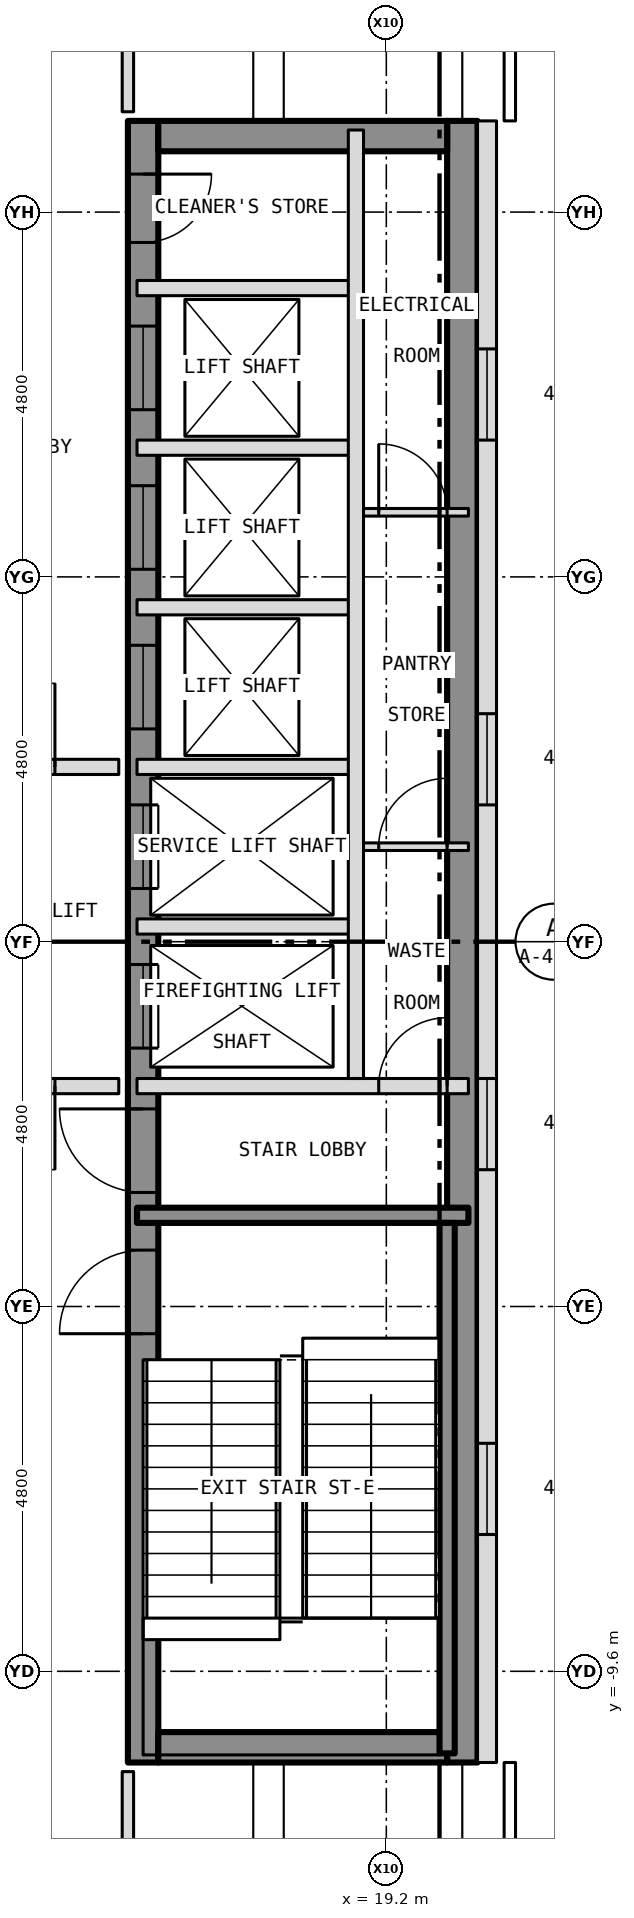
"""IFC4 building model, lengths in metres.
Left out: names, types, materials, properties, quantities, classifications, styles, units other than length and angle.
Written with IfcOpenShell. Run it as: python <this file> out.ifc"""

import sys

from ifc_helpers import new_model, si_unit, direction, frame, frame_2d, origin, place, context, subcontext, project, spatial, rectangle, extrude, element, fill, save


model = new_model("IFC4")
c1 = context("Model", 3, precision=1e-05, world=origin(), true_north=direction((0.0, 1.0)))
c2 = subcontext(c1, "Body", "Model", "MODEL_VIEW")
j1 = project(units=[si_unit("LENGTHUNIT", "METRE"), si_unit("PLANEANGLEUNIT", "RADIAN")], contexts=[c1])
p1 = place(None, origin())
s1 = spatial("IfcSite", under=j1, at=p1, CompositionType="ELEMENT")
p2 = place(p1, origin())
s2 = spatial("IfcBuilding", under=s1, at=p2, CompositionType="ELEMENT")
p3 = place(p2, frame((0.0, 0.0, 236.5)))
s3 = spatial("IfcBuildingStorey", under=s2, at=p3, CompositionType="ELEMENT", Elevation=236.5)
p4 = place(p3, frame((16.0, -10.8, 0.0), z_axis=(0.0, 0.0, 1.0), x_axis=(0.0, 1.0, 0.0)))
e1 = element("IfcWall", 1, at=p4, inside=s3, PredefinedType="SHEAR", context=c2, shape_type="SweptSolid", body=[
    extrude(rectangle(XDim=21.6, YDim=0.4, at=frame_2d((10.8, 0.0))), origin(), (0.0, 0.0, 1.0), 3.9),
])
p5 = place(p4, frame((9.4, 0.0, 0.0)))
e2 = element("IfcOpeningElement", 2, at=p5, cuts=e1, PredefinedType="OPENING", context=c2, shape_type="SweptSolid", body=[
    extrude(rectangle(XDim=1.1, YDim=2.1, at=frame_2d((0.55, 1.05))), frame((0.0, 0.212, 0.0), z_axis=(0.0, -1.0, 0.0), x_axis=(1.0, 0.0, 0.0)), (0.0, 0.0, 1.0), 0.424),
])
p6 = place(p4, frame((11.5, 0.0, 0.0)))
e3 = element("IfcOpeningElement", 3, at=p6, cuts=e1, PredefinedType="OPENING", context=c2, shape_type="SweptSolid", body=[
    extrude(rectangle(XDim=1.1, YDim=2.1, at=frame_2d((0.55, 1.05))), frame((0.0, 0.212, 0.0), z_axis=(0.0, -1.0, 0.0), x_axis=(1.0, 0.0, 0.0)), (0.0, 0.0, 1.0), 0.424),
])
p7 = place(p4, frame((13.6, 0.0, 0.0)))
e4 = element("IfcOpeningElement", 4, at=p7, cuts=e1, PredefinedType="OPENING", context=c2, shape_type="SweptSolid", body=[
    extrude(rectangle(XDim=1.1, YDim=2.1, at=frame_2d((0.55, 1.05))), frame((0.0, 0.212, 0.0), z_axis=(0.0, -1.0, 0.0), x_axis=(1.0, 0.0, 0.0)), (0.0, 0.0, 1.0), 0.424),
])
p8 = place(p4, frame((15.7, 0.0, 0.0)))
e5 = element("IfcOpeningElement", 5, at=p8, cuts=e1, PredefinedType="OPENING", context=c2, shape_type="SweptSolid", body=[
    extrude(rectangle(XDim=1.1, YDim=2.1, at=frame_2d((0.55, 1.05))), frame((0.0, 0.212, 0.0), z_axis=(0.0, -1.0, 0.0), x_axis=(1.0, 0.0, 0.0)), (0.0, 0.0, 1.0), 0.424),
])
p9 = place(p4, frame((17.8, 0.0, 0.0)))
e6 = element("IfcOpeningElement", 6, at=p9, cuts=e1, PredefinedType="OPENING", context=c2, shape_type="SweptSolid", body=[
    extrude(rectangle(XDim=1.1, YDim=2.1, at=frame_2d((0.55, 1.05))), frame((0.0, 0.212, 0.0), z_axis=(0.0, -1.0, 0.0), x_axis=(1.0, 0.0, 0.0)), (0.0, 0.0, 1.0), 0.424),
])
p10 = place(p4, frame((5.642, 0.0, 0.0)))
e7 = element("IfcOpeningElement", 7, at=p10, cuts=e1, PredefinedType="OPENING", context=c2, shape_type="SweptSolid", body=[
    extrude(rectangle(XDim=1.1, YDim=2.1, at=frame_2d((0.55, 1.05))), frame((0.0, 0.212, 0.0), z_axis=(0.0, -1.0, 0.0), x_axis=(1.0, 0.0, 0.0)), (0.0, 0.0, 1.0), 0.424),
])
p11 = place(p4, frame((7.5, 0.0, 0.0)))
e8 = element("IfcOpeningElement", 8, at=p11, cuts=e1, PredefinedType="OPENING", context=c2, shape_type="SweptSolid", body=[
    extrude(rectangle(XDim=1.1, YDim=2.1, at=frame_2d((0.55, 1.05))), frame((0.0, 0.212, 0.0), z_axis=(0.0, -1.0, 0.0), x_axis=(1.0, 0.0, 0.0)), (0.0, 0.0, 1.0), 0.424),
])
p12 = place(p4, frame((20.0, 0.0, 0.0)))
e9 = element("IfcOpeningElement", 9, at=p12, cuts=e1, PredefinedType="OPENING", context=c2, shape_type="SweptSolid", body=[
    extrude(rectangle(XDim=0.9, YDim=2.1, at=frame_2d((0.45, 1.05))), frame((0.0, 0.212, 0.0), z_axis=(0.0, -1.0, 0.0), x_axis=(1.0, 0.0, 0.0)), (0.0, 0.0, 1.0), 0.424),
])
p13 = place(p3, frame((20.2, -10.8, 0.0), z_axis=(0.0, 0.0, 1.0), x_axis=(0.0, 1.0, 0.0)))
e10 = element("IfcWall", 10, at=p13, inside=s3, PredefinedType="SHEAR", context=c2, shape_type="SweptSolid", body=[
    extrude(rectangle(XDim=21.6, YDim=0.4, at=frame_2d((10.8, 0.0))), origin(), (0.0, 0.0, 1.0), 3.9),
])
for number, where, z_axis, x_axis in (
    (11, (16.2, 10.6, 0.0), (0.0, 0.0, 1.0), (1.0, 0.0, 0.0)),
    (12, (16.2, -10.6, 0.0), (0.0, 0.0, 1.0), (1.0, 0.0, 0.0)),
):
    element("IfcWall", number, at=place(p3, frame(where, z_axis=z_axis, x_axis=x_axis)), inside=s3, PredefinedType="SHEAR", context=c2, shape_type="SweptSolid", body=[
        extrude(rectangle(XDim=3.8, YDim=0.4, at=frame_2d((1.9, 0.0))), origin(), (0.0, 0.0, 1.0), 3.9),
    ])
p14 = place(p3, frame((20.525, -10.8, 0.0), z_axis=(0.0, 0.0, 1.0), x_axis=(0.0, 1.0, 0.0)))
e13 = element("IfcWall", 13, at=p14, inside=s3, PredefinedType="SOLIDWALL", context=c2, shape_type="SweptSolid", body=[
    extrude(rectangle(XDim=21.6, YDim=0.25, at=frame_2d((10.8, 0.0))), origin(), (0.0, 0.0, 1.0), 4.5),
])
p15 = place(p14, frame((3.0, 0.0, 2.2)))
e14 = element("IfcOpeningElement", 14, at=p15, cuts=e13, PredefinedType="OPENING", context=c2, shape_type="SweptSolid", body=[
    extrude(rectangle(XDim=1.2, YDim=0.6, at=frame_2d((0.6, 0.3))), frame((0.0, 0.137, 0.0), z_axis=(0.0, -1.0, 0.0), x_axis=(1.0, 0.0, 0.0)), (0.0, 0.0, 1.0), 0.274),
])
p16 = place(p14, frame((7.8, 0.0, 2.2)))
e15 = element("IfcOpeningElement", 15, at=p16, cuts=e13, PredefinedType="OPENING", context=c2, shape_type="SweptSolid", body=[
    extrude(rectangle(XDim=1.2, YDim=0.6, at=frame_2d((0.6, 0.3))), frame((0.0, 0.137, 0.0), z_axis=(0.0, -1.0, 0.0), x_axis=(1.0, 0.0, 0.0)), (0.0, 0.0, 1.0), 0.274),
])
p17 = place(p14, frame((12.6, 0.0, 2.2)))
e16 = element("IfcOpeningElement", 16, at=p17, cuts=e13, PredefinedType="OPENING", context=c2, shape_type="SweptSolid", body=[
    extrude(rectangle(XDim=1.2, YDim=0.6, at=frame_2d((0.6, 0.3))), frame((0.0, 0.137, 0.0), z_axis=(0.0, -1.0, 0.0), x_axis=(1.0, 0.0, 0.0)), (0.0, 0.0, 1.0), 0.274),
])
p18 = place(p14, frame((17.4, 0.0, 2.2)))
e17 = element("IfcOpeningElement", 17, at=p18, cuts=e13, PredefinedType="OPENING", context=c2, shape_type="SweptSolid", body=[
    extrude(rectangle(XDim=1.2, YDim=0.6, at=frame_2d((0.6, 0.3))), frame((0.0, 0.137, 0.0), z_axis=(0.0, -1.0, 0.0), x_axis=(1.0, 0.0, 0.0)), (0.0, 0.0, 1.0), 0.274),
])
p19 = place(p3, frame((15.92, -3.6, 0.0), z_axis=(0.0, 0.0, 1.0), x_axis=(1.0, 0.0, 0.0)))
e18 = element("IfcWall", 18, at=p19, inside=s3, PredefinedType="SHEAR", context=c2, shape_type="SweptSolid", body=[
    extrude(rectangle(XDim=4.36, YDim=0.2, at=frame_2d((2.18, 0.0))), origin(), (0.0, 0.0, 1.0), 3.9),
])
p20 = place(p3, frame((12.4, -1.9, 0.0), z_axis=(0.0, 0.0, 1.0), x_axis=(1.0, 0.0, 0.0)))
e19 = element("IfcWall", 19, at=p20, inside=s3, PredefinedType="PARTITIONING", context=c2, shape_type="SweptSolid", body=[
    extrude(rectangle(XDim=3.28, YDim=0.2, at=frame_2d((1.64, 0.0))), origin(), (0.0, 0.0, 1.0), 4.35),
])
p21 = place(p20, frame((1.34, 0.0, 0.0)))
e20 = element("IfcOpeningElement", 20, at=p21, cuts=e19, PredefinedType="OPENING", context=c2, shape_type="SweptSolid", body=[
    extrude(rectangle(XDim=1.1, YDim=2.1, at=frame_2d((0.55, 1.05))), frame((0.0, 0.112, 0.0), z_axis=(0.0, -1.0, 0.0), x_axis=(1.0, 0.0, 0.0)), (0.0, 0.0, 1.0), 0.224),
])
p22 = place(p3, frame((15.92, -1.9, 0.0), z_axis=(0.0, 0.0, 1.0), x_axis=(1.0, 0.0, 0.0)))
e21 = element("IfcWall", 21, at=p22, inside=s3, PredefinedType="PARTITIONING", context=c2, shape_type="SweptSolid", body=[
    extrude(rectangle(XDim=4.36, YDim=0.2, at=frame_2d((2.18, 0.0))), origin(), (0.0, 0.0, 1.0), 3.9),
])
p23 = place(p22, frame((3.18, 0.0, 0.0)))
e22 = element("IfcOpeningElement", 22, at=p23, cuts=e21, PredefinedType="OPENING", context=c2, shape_type="SweptSolid", body=[
    extrude(rectangle(XDim=0.9, YDim=2.1, at=frame_2d((0.45, 1.05))), frame((0.0, 0.112, 0.0), z_axis=(0.0, -1.0, 0.0), x_axis=(1.0, 0.0, 0.0)), (0.0, 0.0, 1.0), 0.224),
])
p24 = place(p3, frame((15.92, 0.2, 0.0), z_axis=(0.0, 0.0, 1.0), x_axis=(1.0, 0.0, 0.0)))
e23 = element("IfcWall", 23, at=p24, inside=s3, PredefinedType="PARTITIONING", context=c2, shape_type="SweptSolid", body=[
    extrude(rectangle(XDim=2.88, YDim=0.2, at=frame_2d((1.44, 0.0))), origin(), (0.0, 0.0, 1.0), 3.9),
])
p25 = place(p3, frame((18.8, 1.25, 0.0), z_axis=(0.0, 0.0, 1.0), x_axis=(1.0, 0.0, 0.0)))
e24 = element("IfcWall", 24, at=p25, inside=s3, PredefinedType="PARTITIONING", context=c2, shape_type="SweptSolid", body=[
    extrude(rectangle(XDim=1.48, YDim=0.1, at=frame_2d((0.74, 0.0))), origin(), (0.0, 0.0, 1.0), 3.9),
])
p26 = place(p25, frame((0.3, 0.0, 0.0)))
e25 = element("IfcOpeningElement", 25, at=p26, cuts=e24, PredefinedType="OPENING", context=c2, shape_type="SweptSolid", body=[
    extrude(rectangle(XDim=0.9, YDim=2.1, at=frame_2d((0.45, 1.05))), frame((0.0, 0.062, 0.0), z_axis=(0.0, -1.0, 0.0), x_axis=(1.0, 0.0, 0.0)), (0.0, 0.0, 1.0), 0.124),
])
p27 = place(p3, frame((12.4, 2.3, 0.0), z_axis=(0.0, 0.0, 1.0), x_axis=(1.0, 0.0, 0.0)))
e26 = element("IfcWall", 26, at=p27, inside=s3, PredefinedType="PARTITIONING", context=c2, shape_type="SweptSolid", body=[
    extrude(rectangle(XDim=3.28, YDim=0.2, at=frame_2d((1.64, 0.0))), origin(), (0.0, 0.0, 1.0), 4.35),
])
p28 = place(p27, frame((1.34, 0.0, 0.0)))
e27 = element("IfcOpeningElement", 27, at=p28, cuts=e26, PredefinedType="OPENING", context=c2, shape_type="SweptSolid", body=[
    extrude(rectangle(XDim=1.1, YDim=2.1, at=frame_2d((0.55, 1.05))), frame((0.0, 0.112, 0.0), z_axis=(0.0, -1.0, 0.0), x_axis=(1.0, 0.0, 0.0)), (0.0, 0.0, 1.0), 0.224),
])
for number, where, z_axis, x_axis in (
    (28, (15.92, 2.3, 0.0), (0.0, 0.0, 1.0), (1.0, 0.0, 0.0)),
    (29, (15.92, 4.4, 0.0), (0.0, 0.0, 1.0), (1.0, 0.0, 0.0)),
):
    element("IfcWall", number, at=place(p3, frame(where, z_axis=z_axis, x_axis=x_axis)), inside=s3, PredefinedType="PARTITIONING", context=c2, shape_type="SweptSolid", body=[
        extrude(rectangle(XDim=2.88, YDim=0.2, at=frame_2d((1.44, 0.0))), origin(), (0.0, 0.0, 1.0), 3.9),
    ])
p29 = place(p3, frame((18.8, 5.65, 0.0), z_axis=(0.0, 0.0, 1.0), x_axis=(1.0, 0.0, 0.0)))
e30 = element("IfcWall", 30, at=p29, inside=s3, PredefinedType="PARTITIONING", context=c2, shape_type="SweptSolid", body=[
    extrude(rectangle(XDim=1.48, YDim=0.1, at=frame_2d((0.74, 0.0))), origin(), (0.0, 0.0, 1.0), 3.9),
])
p30 = place(p29, frame((0.3, 0.0, 0.0)))
e31 = element("IfcOpeningElement", 31, at=p30, cuts=e30, PredefinedType="OPENING", context=c2, shape_type="SweptSolid", body=[
    extrude(rectangle(XDim=0.9, YDim=2.1, at=frame_2d((0.45, 1.05))), frame((0.0, 0.062, 0.0), z_axis=(0.0, -1.0, 0.0), x_axis=(1.0, 0.0, 0.0)), (0.0, 0.0, 1.0), 0.124),
])
for number, where, z_axis, x_axis in (
    (32, (15.92, 6.5, 0.0), (0.0, 0.0, 1.0), (1.0, 0.0, 0.0)),
    (33, (15.92, 8.6, 0.0), (0.0, 0.0, 1.0), (1.0, 0.0, 0.0)),
):
    element("IfcWall", number, at=place(p3, frame(where, z_axis=z_axis, x_axis=x_axis)), inside=s3, PredefinedType="PARTITIONING", context=c2, shape_type="SweptSolid", body=[
        extrude(rectangle(XDim=2.88, YDim=0.2, at=frame_2d((1.44, 0.0))), origin(), (0.0, 0.0, 1.0), 3.9),
    ])
for number, where, z_axis, x_axis in (
    (34, (15.8, -12.725, 0.0), (0.0, 0.0, 1.0), (0.0, 1.0, 0.0)),
    (35, (15.8, 10.92, 0.0), (0.0, 0.0, 1.0), (0.0, 1.0, 0.0)),
):
    element("IfcWall", number, at=place(p3, frame(where, z_axis=z_axis, x_axis=x_axis)), inside=s3, PredefinedType="PARTITIONING", context=c2, shape_type="SweptSolid", body=[
        extrude(rectangle(XDim=1.805, YDim=0.15, at=frame_2d((0.903, 0.0))), origin(), (0.0, 0.0, 1.0), 4.35),
    ])
p31 = place(p3, frame((18.8, -1.8, 0.0), z_axis=(0.0, 0.0, 1.0), x_axis=(0.0, 1.0, 0.0)))
e36 = element("IfcWall", 36, at=p31, inside=s3, PredefinedType="PARTITIONING", context=c2, shape_type="SweptSolid", body=[
    extrude(rectangle(XDim=12.48, YDim=0.2, at=frame_2d((6.24, 0.0))), origin(), (0.0, 0.0, 1.0), 3.9),
])
p32 = place(p3, frame((20.0, -10.68, 0.0), z_axis=(0.0, 0.0, 1.0), x_axis=(0.0, 1.0, 0.0)))
e37 = element("IfcWall", 37, at=p32, inside=s3, PredefinedType="SHEAR", context=c2, shape_type="SweptSolid", body=[
    extrude(rectangle(XDim=6.98, YDim=0.2, at=frame_2d((3.49, 0.0))), origin(), (0.0, 0.0, 1.0), 3.9),
])
p33 = place(p15, origin())
e38 = element("IfcWindow", 38, at=p33, inside=s3, PartitioningType="SINGLE_PANEL", PredefinedType="WINDOW", context=c2, shape_type="SweptSolid", body=[
    extrude(rectangle(XDim=1.2, YDim=0.6, at=frame_2d((0.6, 0.3))), frame((0.0, -0.035, 0.0), z_axis=(0.0, -1.0, 0.0), x_axis=(1.0, 0.0, 0.0)), (0.0, 0.0, 1.0), 0.06),
])
fill(e14, e38)
p34 = place(p16, origin())
e39 = element("IfcWindow", 39, at=p34, inside=s3, PartitioningType="SINGLE_PANEL", PredefinedType="WINDOW", context=c2, shape_type="SweptSolid", body=[
    extrude(rectangle(XDim=1.2, YDim=0.6, at=frame_2d((0.6, 0.3))), frame((0.0, -0.035, 0.0), z_axis=(0.0, -1.0, 0.0), x_axis=(1.0, 0.0, 0.0)), (0.0, 0.0, 1.0), 0.06),
])
fill(e15, e39)
p35 = place(p17, origin())
e40 = element("IfcWindow", 40, at=p35, inside=s3, PartitioningType="SINGLE_PANEL", PredefinedType="WINDOW", context=c2, shape_type="SweptSolid", body=[
    extrude(rectangle(XDim=1.2, YDim=0.6, at=frame_2d((0.6, 0.3))), frame((0.0, -0.035, 0.0), z_axis=(0.0, -1.0, 0.0), x_axis=(1.0, 0.0, 0.0)), (0.0, 0.0, 1.0), 0.06),
])
fill(e16, e40)
p36 = place(p18, origin())
e41 = element("IfcWindow", 41, at=p36, inside=s3, PartitioningType="SINGLE_PANEL", PredefinedType="WINDOW", context=c2, shape_type="SweptSolid", body=[
    extrude(rectangle(XDim=1.2, YDim=0.6, at=frame_2d((0.6, 0.3))), frame((0.0, -0.035, 0.0), z_axis=(0.0, -1.0, 0.0), x_axis=(1.0, 0.0, 0.0)), (0.0, 0.0, 1.0), 0.06),
])
fill(e17, e41)
p37 = place(p5, origin())
e42 = element("IfcDoor", 42, at=p37, inside=s3, OperationType="SLIDING_TO_LEFT", PredefinedType="DOOR", context=c2, shape_type="SweptSolid", body=[
    extrude(rectangle(XDim=1.1, YDim=2.1, at=frame_2d((0.55, 1.05))), frame((0.0, 0.025, 0.0), z_axis=(0.0, -1.0, 0.0), x_axis=(1.0, 0.0, 0.0)), (0.0, 0.0, 1.0), 0.05),
])
fill(e2, e42)
p38 = place(p6, origin())
e43 = element("IfcDoor", 43, at=p38, inside=s3, OperationType="SLIDING_TO_LEFT", PredefinedType="DOOR", context=c2, shape_type="SweptSolid", body=[
    extrude(rectangle(XDim=1.1, YDim=2.1, at=frame_2d((0.55, 1.05))), frame((0.0, 0.025, 0.0), z_axis=(0.0, -1.0, 0.0), x_axis=(1.0, 0.0, 0.0)), (0.0, 0.0, 1.0), 0.05),
])
fill(e3, e43)
p39 = place(p7, origin())
e44 = element("IfcDoor", 44, at=p39, inside=s3, OperationType="SLIDING_TO_LEFT", PredefinedType="DOOR", context=c2, shape_type="SweptSolid", body=[
    extrude(rectangle(XDim=1.1, YDim=2.1, at=frame_2d((0.55, 1.05))), frame((0.0, 0.025, 0.0), z_axis=(0.0, -1.0, 0.0), x_axis=(1.0, 0.0, 0.0)), (0.0, 0.0, 1.0), 0.05),
])
fill(e4, e44)
p40 = place(p8, origin())
e45 = element("IfcDoor", 45, at=p40, inside=s3, OperationType="SLIDING_TO_LEFT", PredefinedType="DOOR", context=c2, shape_type="SweptSolid", body=[
    extrude(rectangle(XDim=1.1, YDim=2.1, at=frame_2d((0.55, 1.05))), frame((0.0, 0.025, 0.0), z_axis=(0.0, -1.0, 0.0), x_axis=(1.0, 0.0, 0.0)), (0.0, 0.0, 1.0), 0.05),
])
fill(e5, e45)
p41 = place(p9, origin())
e46 = element("IfcDoor", 46, at=p41, inside=s3, OperationType="SLIDING_TO_LEFT", PredefinedType="DOOR", context=c2, shape_type="SweptSolid", body=[
    extrude(rectangle(XDim=1.1, YDim=2.1, at=frame_2d((0.55, 1.05))), frame((0.0, 0.025, 0.0), z_axis=(0.0, -1.0, 0.0), x_axis=(1.0, 0.0, 0.0)), (0.0, 0.0, 1.0), 0.05),
])
fill(e6, e46)
p42 = place(p10, origin())
e47 = element("IfcDoor", 47, at=p42, inside=s3, OperationType="SINGLE_SWING_LEFT", PredefinedType="DOOR", context=c2, shape_type="SweptSolid", body=[
    extrude(rectangle(XDim=1.1, YDim=2.1, at=frame_2d((0.55, 1.05))), frame((0.0, 0.025, 0.0), z_axis=(0.0, -1.0, 0.0), x_axis=(1.0, 0.0, 0.0)), (0.0, 0.0, 1.0), 0.05),
])
fill(e7, e47)
p43 = place(p11, origin())
e48 = element("IfcDoor", 48, at=p43, inside=s3, OperationType="SINGLE_SWING_RIGHT", PredefinedType="DOOR", context=c2, shape_type="SweptSolid", body=[
    extrude(rectangle(XDim=1.1, YDim=2.1, at=frame_2d((0.55, 1.05))), frame((0.0, 0.025, 0.0), z_axis=(0.0, -1.0, 0.0), x_axis=(1.0, 0.0, 0.0)), (0.0, 0.0, 1.0), 0.05),
])
fill(e8, e48)
p44 = place(p12, origin())
e49 = element("IfcDoor", 49, at=p44, inside=s3, OperationType="SINGLE_SWING_RIGHT", PredefinedType="DOOR", context=c2, shape_type="SweptSolid", body=[
    extrude(rectangle(XDim=0.9, YDim=2.1, at=frame_2d((0.45, 1.05))), frame((0.0, 0.025, 0.0), z_axis=(0.0, -1.0, 0.0), x_axis=(1.0, 0.0, 0.0)), (0.0, 0.0, 1.0), 0.05),
])
fill(e9, e49)
p45 = place(p23, origin())
e50 = element("IfcDoor", 50, at=p45, inside=s3, OperationType="SINGLE_SWING_RIGHT", PredefinedType="DOOR", context=c2, shape_type="SweptSolid", body=[
    extrude(rectangle(XDim=0.9, YDim=2.1, at=frame_2d((0.45, 1.05))), frame((0.0, 0.025, 0.0), z_axis=(0.0, -1.0, 0.0), x_axis=(1.0, 0.0, 0.0)), (0.0, 0.0, 1.0), 0.05),
])
fill(e22, e50)
p46 = place(p26, origin())
e51 = element("IfcDoor", 51, at=p46, inside=s3, OperationType="SINGLE_SWING_RIGHT", PredefinedType="DOOR", context=c2, shape_type="SweptSolid", body=[
    extrude(rectangle(XDim=0.9, YDim=2.1, at=frame_2d((0.45, 1.05))), frame((0.0, 0.025, 0.0), z_axis=(0.0, -1.0, 0.0), x_axis=(1.0, 0.0, 0.0)), (0.0, 0.0, 1.0), 0.05),
])
fill(e25, e51)
p47 = place(p30, origin())
e52 = element("IfcDoor", 52, at=p47, inside=s3, OperationType="SINGLE_SWING_LEFT", PredefinedType="DOOR", context=c2, shape_type="SweptSolid", body=[
    extrude(rectangle(XDim=0.9, YDim=2.1, at=frame_2d((0.45, 1.05))), frame((0.0, 0.025, 0.0), z_axis=(0.0, -1.0, 0.0), x_axis=(1.0, 0.0, 0.0)), (0.0, 0.0, 1.0), 0.05),
])
fill(e31, e52)
p48 = place(p28, origin())
e53 = element("IfcDoor", 53, at=p48, inside=s3, OperationType="SINGLE_SWING_RIGHT", PredefinedType="DOOR", context=c2, shape_type="SweptSolid", body=[
    extrude(rectangle(XDim=1.1, YDim=2.1, at=frame_2d((0.55, 1.05))), frame((0.0, 0.025, 0.0), z_axis=(0.0, -1.0, 0.0), x_axis=(1.0, 0.0, 0.0)), (0.0, 0.0, 1.0), 0.05),
])
fill(e27, e53)
p49 = place(p21, origin())
e54 = element("IfcDoor", 54, at=p49, inside=s3, OperationType="SINGLE_SWING_RIGHT", PredefinedType="DOOR", context=c2, shape_type="SweptSolid", body=[
    extrude(rectangle(XDim=1.1, YDim=2.1, at=frame_2d((0.55, 1.05))), frame((0.0, 0.025, 0.0), z_axis=(0.0, -1.0, 0.0), x_axis=(1.0, 0.0, 0.0)), (0.0, 0.0, 1.0), 0.05),
])
fill(e20, e54)
save(model, sys.argv[1])
